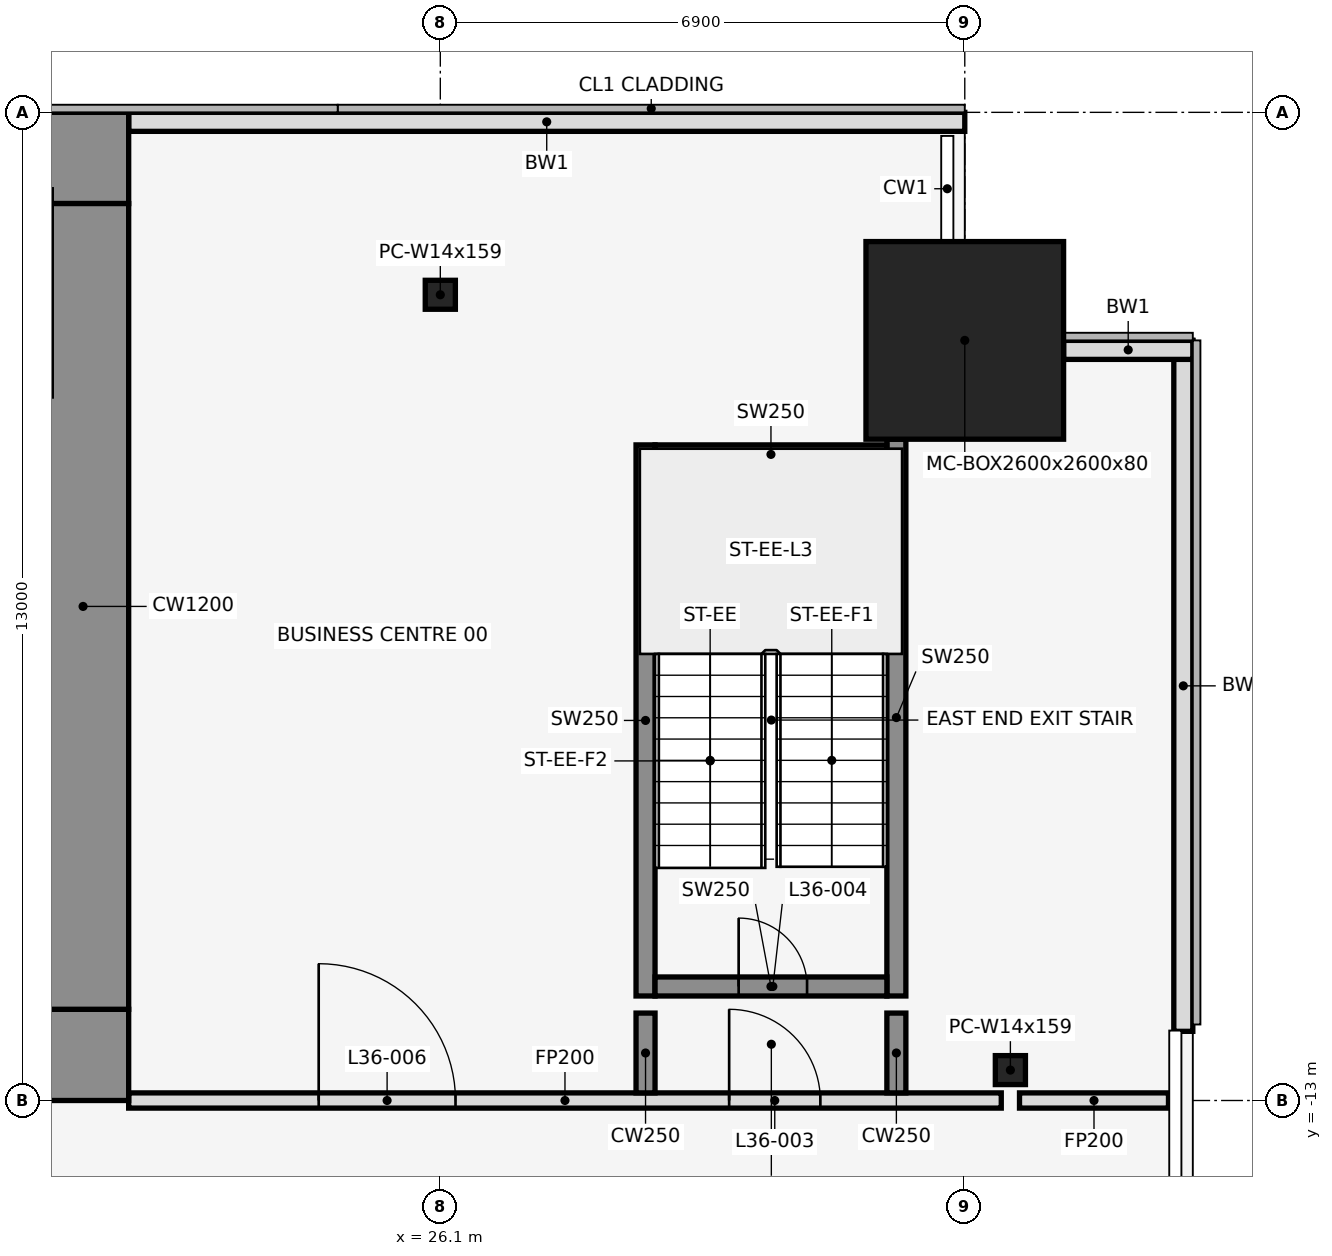
"""IFC4 building model, lengths in metres.
Left out: names, types, materials, properties, quantities, classifications, styles, units other than length and angle.
Written with IfcOpenShell. Run it as: python <this file> out.ifc"""

import sys

from ifc_helpers import new_model, si_unit, direction, frame, frame_2d, origin, origin_2d, place, context, subcontext, project, spatial, rectangle, hollow_rectangle, i_section, extrude, element, fill, save


model = new_model("IFC4")
c1 = context("Model", 3, precision=1e-05, world=origin(), true_north=direction((0.0, 1.0)))
c2 = subcontext(c1, "Body", "Model", "MODEL_VIEW")
j1 = project(units=[si_unit("LENGTHUNIT", "METRE"), si_unit("PLANEANGLEUNIT", "RADIAN")], contexts=[c1])
p1 = place(None, origin())
s1 = spatial("IfcSite", under=j1, at=p1, CompositionType="ELEMENT")
p2 = place(p1, origin())
s2 = spatial("IfcBuilding", under=s1, at=p2, CompositionType="ELEMENT")
p3 = place(p2, frame((0.0, 0.0, 165.0)))
s3 = spatial("IfcBuildingStorey", under=s2, at=p3, CompositionType="ELEMENT", Elevation=165.0)
p4 = place(p3, frame((26.1, -2.4, 0.0), z_axis=(0.0, 0.0, 1.0), x_axis=(1.0, 0.0, 0.0)))
e1 = element("IfcColumn", 1, at=p4, inside=s3, PredefinedType="COLUMN", context=c2, shape_type="SweptSolid", body=[
    extrude(i_section(OverallWidth=0.396, OverallDepth=0.381, WebThickness=0.019, FlangeThickness=0.03, at=origin_2d()), origin(), (0.0, 0.0, 1.0), 4.1),
])
p5 = place(p3, frame((33.0, -3.0, 0.0), z_axis=(0.0, 0.0, 1.0), x_axis=(1.0, 0.0, 0.0)))
e2 = element("IfcColumn", 2, at=p5, inside=s3, PredefinedType="COLUMN", context=c2, shape_type="SweptSolid", body=[
    extrude(hollow_rectangle(XDim=2.6, YDim=2.6, WallThickness=0.08, at=origin_2d()), origin(), (0.0, 0.0, 1.0), 4.1),
])
p6 = place(p3, frame((33.6, -12.6, 0.0), z_axis=(0.0, 0.0, 1.0), x_axis=(1.0, 0.0, 0.0)))
e3 = element("IfcColumn", 3, at=p6, inside=s3, PredefinedType="COLUMN", context=c2, shape_type="SweptSolid", body=[
    extrude(i_section(OverallWidth=0.396, OverallDepth=0.381, WebThickness=0.019, FlangeThickness=0.03, at=origin_2d()), origin(), (0.0, 0.0, 1.0), 4.1),
])
p7 = place(p3, frame((33.0, -0.125, 0.0), z_axis=(0.0, 0.0, 1.0), x_axis=(-1.0, 0.0, 0.0)))
e4 = element("IfcWall", 4, at=p7, inside=s3, PredefinedType="STANDARD", context=c2, shape_type="SweptSolid", body=[
    extrude(rectangle(XDim=11.0, YDim=0.25, at=frame_2d((5.5, 0.0))), origin(), (0.0, 0.0, 1.0), 3.95),
])
p8 = place(p3, frame((35.875, -12.09, 0.0), z_axis=(0.0, 0.0, 1.0), x_axis=(0.0, 1.0, 0.0)))
e5 = element("IfcWall", 5, at=p8, inside=s3, PredefinedType="STANDARD", context=c2, shape_type="SweptSolid", body=[
    extrude(rectangle(XDim=9.09, YDim=0.25, at=frame_2d((4.545, 0.0))), origin(), (0.0, 0.0, 1.0), 3.95),
])
p9 = place(p3, frame((36.0, -3.125, 0.0), z_axis=(0.0, 0.0, 1.0), x_axis=(-1.0, 0.0, 0.0)))
e6 = element("IfcWall", 6, at=p9, inside=s3, PredefinedType="STANDARD", context=c2, shape_type="SweptSolid", body=[
    extrude(rectangle(XDim=1.7, YDim=0.25, at=frame_2d((0.85, 0.0))), origin(), (0.0, 0.0, 1.0), 3.95),
])
p10 = place(p3, frame((28.8, -11.625, 0.0), z_axis=(0.0, 0.0, 1.0), x_axis=(0.0, 1.0, 0.0)))
e7 = element("IfcWall", 7, at=p10, inside=s3, PredefinedType="SHEAR", context=c2, shape_type="SweptSolid", body=[
    extrude(rectangle(XDim=7.25, YDim=0.25, at=frame_2d((3.625, 0.0))), origin(), (0.0, 0.0, 1.0), 4.1),
])
p11 = place(p3, frame((32.1, -11.625, 0.0), z_axis=(0.0, 0.0, 1.0), x_axis=(0.0, 1.0, 0.0)))
e8 = element("IfcWall", 8, at=p11, inside=s3, PredefinedType="SHEAR", context=c2, shape_type="SweptSolid", body=[
    extrude(rectangle(XDim=7.325, YDim=0.25, at=frame_2d((3.663, 0.0))), origin(), (0.0, 0.0, 1.0), 4.1),
])
p12 = place(p3, frame((28.925, -11.5, 0.0), z_axis=(0.0, 0.0, 1.0), x_axis=(1.0, 0.0, 0.0)))
e9 = element("IfcWall", 9, at=p12, inside=s3, PredefinedType="SHEAR", context=c2, shape_type="SweptSolid", body=[
    extrude(rectangle(XDim=3.05, YDim=0.25, at=frame_2d((1.525, 0.0))), origin(), (0.0, 0.0, 1.0), 4.1),
])
p13 = place(p12, frame((1.1, 0.0, 0.0)))
e10 = element("IfcOpeningElement", 10, at=p13, cuts=e9, PredefinedType="OPENING", context=c2, shape_type="SweptSolid", body=[
    extrude(rectangle(XDim=0.9, YDim=2.1, at=frame_2d((0.45, 1.05))), frame((0.0, 0.137, 0.0), z_axis=(0.0, -1.0, 0.0), x_axis=(1.0, 0.0, 0.0)), (0.0, 0.0, 1.0), 0.274),
])
p14 = place(p3, frame((28.925, -4.5, 0.0), z_axis=(0.0, 0.0, 1.0), x_axis=(1.0, 0.0, 0.0)))
e11 = element("IfcWall", 11, at=p14, inside=s3, PredefinedType="SHEAR", context=c2, shape_type="SweptSolid", body=[
    extrude(rectangle(XDim=3.05, YDim=0.25, at=frame_2d((1.525, 0.0))), origin(), (0.0, 0.0, 1.0), 4.1),
])
p15 = place(p3, frame((22.0, -13.0, 0.0), z_axis=(0.0, 0.0, 1.0), x_axis=(1.0, 0.0, 0.0)))
e12 = element("IfcWall", 12, at=p15, inside=s3, PredefinedType="PARTITIONING", context=c2, shape_type="SweptSolid", body=[
    extrude(rectangle(XDim=11.48, YDim=0.2, at=frame_2d((5.74, 0.0))), origin(), (0.0, 0.0, 1.0), 2.84),
])
p16 = place(p15, frame((7.9, 0.0, 0.0)))
e13 = element("IfcOpeningElement", 13, at=p16, cuts=e12, PredefinedType="OPENING", context=c2, shape_type="SweptSolid", body=[
    extrude(rectangle(XDim=1.2, YDim=2.1, at=frame_2d((0.6, 1.05))), frame((0.0, 0.112, 0.0), z_axis=(0.0, -1.0, 0.0), x_axis=(1.0, 0.0, 0.0)), (0.0, 0.0, 1.0), 0.224),
])
p17 = place(p15, frame((2.5, 0.0, 0.0)))
e14 = element("IfcOpeningElement", 14, at=p17, cuts=e12, PredefinedType="OPENING", context=c2, shape_type="SweptSolid", body=[
    extrude(rectangle(XDim=1.8, YDim=2.1, at=frame_2d((0.9, 1.05))), frame((0.0, 0.112, 0.0), z_axis=(0.0, -1.0, 0.0), x_axis=(1.0, 0.0, 0.0)), (0.0, 0.0, 1.0), 0.224),
])
p18 = place(p3, frame((33.72, -13.0, 0.0), z_axis=(0.0, 0.0, 1.0), x_axis=(1.0, 0.0, 0.0)))
e15 = element("IfcWall", 15, at=p18, inside=s3, PredefinedType="PARTITIONING", context=c2, shape_type="SweptSolid", body=[
    extrude(rectangle(XDim=1.96, YDim=0.2, at=frame_2d((0.98, 0.0))), origin(), (0.0, 0.0, 1.0), 2.84),
])
for number, where, z_axis, x_axis in (
    (16, (28.8, -12.9, 0.0), (0.0, 0.0, 1.0), (0.0, 1.0, 0.0)),
    (17, (32.1, -12.9, 0.0), (0.0, 0.0, 1.0), (0.0, 1.0, 0.0)),
):
    element("IfcWall", number, at=place(p3, frame(where, z_axis=z_axis, x_axis=x_axis)), inside=s3, PredefinedType="SHEAR", context=c2, shape_type="SweptSolid", body=[
        extrude(rectangle(XDim=1.05, YDim=0.25, at=frame_2d((0.525, 0.0))), origin(), (0.0, 0.0, 1.0), 4.1),
    ])
p19 = place(p3, frame((-22.0, -0.6, 0.0), z_axis=(0.0, 0.0, 1.0), x_axis=(1.0, 0.0, 0.0)))
e18 = element("IfcWall", 18, at=p19, inside=s3, PredefinedType="SHEAR", context=c2, shape_type="SweptSolid", body=[
    extrude(rectangle(XDim=44.0, YDim=1.2, at=frame_2d((22.0, 0.0))), origin(), (0.0, 0.0, 1.0), 4.1),
])
p20 = place(p19, frame((18.55, 0.0, 0.0)))
e19 = element("IfcOpeningElement", 19, at=p20, cuts=e18, PredefinedType="OPENING", context=c2, shape_type="SweptSolid", body=[
    extrude(rectangle(XDim=0.9, YDim=2.1, at=frame_2d((0.45, 1.05))), frame((0.0, 0.612, 0.0), z_axis=(0.0, -1.0, 0.0), x_axis=(1.0, 0.0, 0.0)), (0.0, 0.0, 1.0), 1.224),
])
p21 = place(p19, frame((24.55, 0.0, 0.0)))
e20 = element("IfcOpeningElement", 20, at=p21, cuts=e18, PredefinedType="OPENING", context=c2, shape_type="SweptSolid", body=[
    extrude(rectangle(XDim=0.9, YDim=2.1, at=frame_2d((0.45, 1.05))), frame((0.0, 0.612, 0.0), z_axis=(0.0, -1.0, 0.0), x_axis=(1.0, 0.0, 0.0)), (0.0, 0.0, 1.0), 1.224),
])
p22 = place(p3, frame((-22.0, -12.4, 0.0), z_axis=(0.0, 0.0, 1.0), x_axis=(1.0, 0.0, 0.0)))
e21 = element("IfcWall", 21, at=p22, inside=s3, PredefinedType="SHEAR", context=c2, shape_type="SweptSolid", body=[
    extrude(rectangle(XDim=44.0, YDim=1.2, at=frame_2d((22.0, 0.0))), origin(), (0.0, 0.0, 1.0), 4.1),
])
p23 = place(p22, frame((2.2, 0.0, 0.0)))
e22 = element("IfcOpeningElement", 22, at=p23, cuts=e21, PredefinedType="OPENING", context=c2, shape_type="SweptSolid", body=[
    extrude(rectangle(XDim=1.2, YDim=2.1, at=frame_2d((0.6, 1.05))), frame((0.0, 0.612, 0.0), z_axis=(0.0, -1.0, 0.0), x_axis=(1.0, 0.0, 0.0)), (0.0, 0.0, 1.0), 1.224),
])
p24 = place(p22, frame((21.4, 0.0, 0.0)))
e23 = element("IfcOpeningElement", 23, at=p24, cuts=e21, PredefinedType="OPENING", context=c2, shape_type="SweptSolid", body=[
    extrude(rectangle(XDim=1.2, YDim=2.1, at=frame_2d((0.6, 1.05))), frame((0.0, 0.612, 0.0), z_axis=(0.0, -1.0, 0.0), x_axis=(1.0, 0.0, 0.0)), (0.0, 0.0, 1.0), 1.224),
])
p25 = place(p22, frame((40.6, 0.0, 0.0)))
e24 = element("IfcOpeningElement", 24, at=p25, cuts=e21, PredefinedType="OPENING", context=c2, shape_type="SweptSolid", body=[
    extrude(rectangle(XDim=1.2, YDim=2.1, at=frame_2d((0.6, 1.05))), frame((0.0, 0.612, 0.0), z_axis=(0.0, -1.0, 0.0), x_axis=(1.0, 0.0, 0.0)), (0.0, 0.0, 1.0), 1.224),
])
p26 = place(p22, frame((16.0, 0.0, 0.0)))
e25 = element("IfcOpeningElement", 25, at=p26, cuts=e21, PredefinedType="OPENING", context=c2, shape_type="SweptSolid", body=[
    extrude(rectangle(XDim=1.8, YDim=2.1, at=frame_2d((0.9, 1.05))), frame((0.0, 0.612, 0.0), z_axis=(0.0, -1.0, 0.0), x_axis=(1.0, 0.0, 0.0)), (0.0, 0.0, 1.0), 1.224),
])
p27 = place(p22, frame((6.3, 0.0, 0.0)))
e26 = element("IfcOpeningElement", 26, at=p27, cuts=e21, PredefinedType="OPENING", context=c2, shape_type="SweptSolid", body=[
    extrude(rectangle(XDim=1.2, YDim=2.1, at=frame_2d((0.6, 1.05))), frame((0.0, 0.612, 0.0), z_axis=(0.0, -1.0, 0.0), x_axis=(1.0, 0.0, 0.0)), (0.0, 0.0, 1.0), 1.224),
])
p28 = place(p22, frame((26.2, 0.0, 0.0)))
e27 = element("IfcOpeningElement", 27, at=p28, cuts=e21, PredefinedType="OPENING", context=c2, shape_type="SweptSolid", body=[
    extrude(rectangle(XDim=1.8, YDim=2.1, at=frame_2d((0.9, 1.05))), frame((0.0, 0.612, 0.0), z_axis=(0.0, -1.0, 0.0), x_axis=(1.0, 0.0, 0.0)), (0.0, 0.0, 1.0), 1.224),
])
p29 = place(p22, frame((36.5, 0.0, 0.0)))
e28 = element("IfcOpeningElement", 28, at=p29, cuts=e21, PredefinedType="OPENING", context=c2, shape_type="SweptSolid", body=[
    extrude(rectangle(XDim=1.2, YDim=2.1, at=frame_2d((0.6, 1.05))), frame((0.0, 0.612, 0.0), z_axis=(0.0, -1.0, 0.0), x_axis=(1.0, 0.0, 0.0)), (0.0, 0.0, 1.0), 1.224),
])
p30 = place(p3, frame((21.4, -11.8, 0.0), z_axis=(0.0, 0.0, 1.0), x_axis=(0.0, 1.0, 0.0)))
e29 = element("IfcWall", 29, at=p30, inside=s3, PredefinedType="SHEAR", context=c2, shape_type="SweptSolid", body=[
    extrude(rectangle(XDim=10.6, YDim=1.2, at=frame_2d((5.3, 0.0))), origin(), (0.0, 0.0, 1.0), 4.1),
])
p31 = place(p16, origin())
e30 = element("IfcDoor", 30, at=p31, inside=s3, OperationType="SINGLE_SWING_RIGHT", PredefinedType="DOOR", context=c2, shape_type="SweptSolid", body=[
    extrude(rectangle(XDim=1.2, YDim=2.1, at=frame_2d((0.6, 1.05))), frame((0.0, 0.025, 0.0), z_axis=(0.0, -1.0, 0.0), x_axis=(1.0, 0.0, 0.0)), (0.0, 0.0, 1.0), 0.05),
])
fill(e13, e30)
p32 = place(p13, origin())
e31 = element("IfcDoor", 31, at=p32, inside=s3, OperationType="SINGLE_SWING_LEFT", PredefinedType="DOOR", context=c2, shape_type="SweptSolid", body=[
    extrude(rectangle(XDim=0.9, YDim=2.1, at=frame_2d((0.45, 1.05))), frame((0.0, 0.025, 0.0), z_axis=(0.0, -1.0, 0.0), x_axis=(1.0, 0.0, 0.0)), (0.0, 0.0, 1.0), 0.05),
])
fill(e10, e31)
p33 = place(p17, origin())
e32 = element("IfcDoor", 32, at=p33, inside=s3, OperationType="SINGLE_SWING_LEFT", PredefinedType="DOOR", context=c2, shape_type="SweptSolid", body=[
    extrude(rectangle(XDim=1.8, YDim=2.1, at=frame_2d((0.9, 1.05))), frame((0.0, 0.025, 0.0), z_axis=(0.0, -1.0, 0.0), x_axis=(1.0, 0.0, 0.0)), (0.0, 0.0, 1.0), 0.05),
])
fill(e14, e32)
save(model, sys.argv[1])
